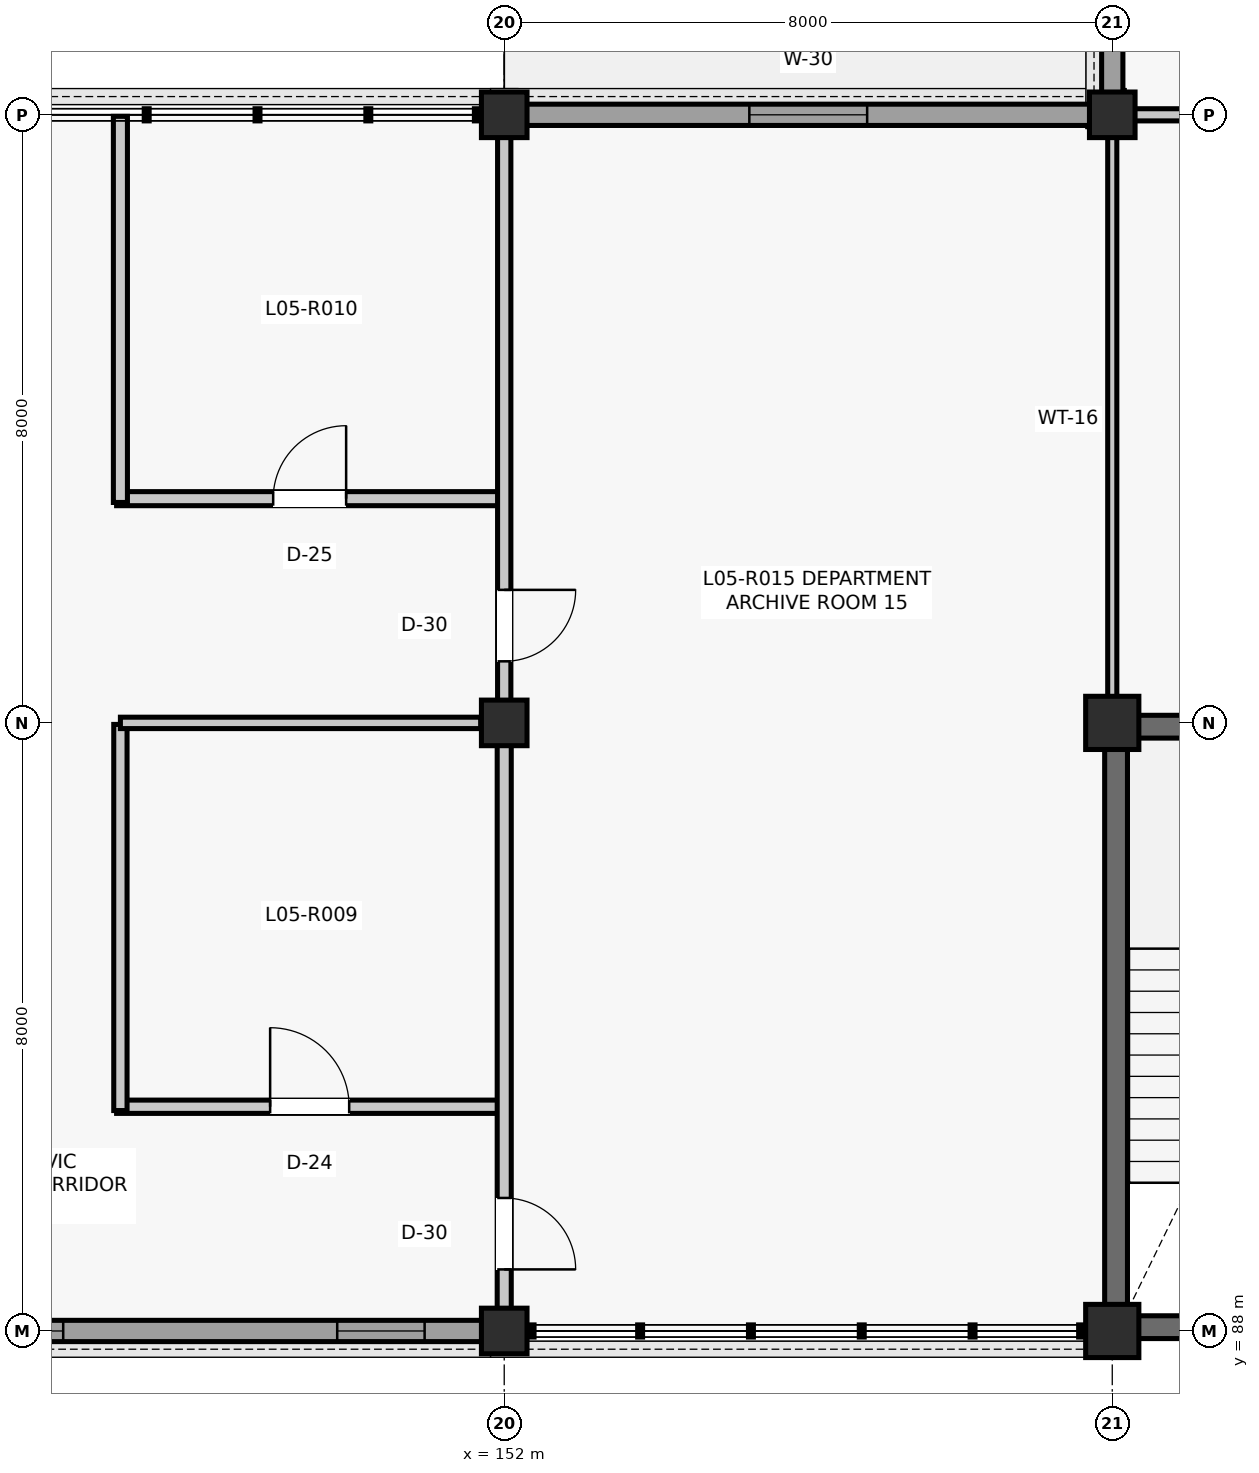
"""IFC4 building model, lengths in metres.
Left out: names, types, materials, properties, quantities, classifications, styles, units other than length and angle.
Written with IfcOpenShell. Run it as: python <this file> out.ifc"""

import sys

from ifc_helpers import new_model, si_unit, direction, frame, frame_2d, origin, origin_2d, place, context, subcontext, project, spatial, rectangle, extrude, element, fill, save


model = new_model("IFC4")
c1 = context("Model", 3, precision=1e-05, world=origin(), true_north=direction((0.0, 1.0)))
c2 = subcontext(c1, "Body", "Model", "MODEL_VIEW")
j1 = project(units=[si_unit("LENGTHUNIT", "METRE"), si_unit("PLANEANGLEUNIT", "RADIAN")], contexts=[c1])
p1 = place(None, origin())
s1 = spatial("IfcSite", under=j1, at=p1, CompositionType="ELEMENT")
p2 = place(p1, origin())
s2 = spatial("IfcBuilding", under=s1, at=p2, CompositionType="ELEMENT")
p3 = place(p2, frame((0.0, 0.0, 21.78)))
s3 = spatial("IfcBuildingStorey", under=s2, at=p3, CompositionType="ELEMENT", Elevation=21.78)
for number, where, z_axis, x_axis in (
    (1, (152.0, 88.0, 0.0), (0.0, 0.0, 1.0), (1.0, 0.0, 0.0)),
    (2, (152.0, 96.0, 0.0), (0.0, 0.0, 1.0), (1.0, 0.0, 0.0)),
    (3, (152.0, 104.0, 0.0), (0.0, 0.0, 1.0), (1.0, 0.0, 0.0)),
):
    element("IfcColumn", number, at=place(p3, frame(where, z_axis=z_axis, x_axis=x_axis)), inside=s3, PredefinedType="COLUMN", context=c2, shape_type="SweptSolid", body=[
        extrude(rectangle(XDim=0.6, YDim=0.6, at=origin_2d()), origin(), (0.0, 0.0, 1.0), 3.96),
    ])
for number, where, z_axis, x_axis in (
    (4, (160.0, 88.0, 0.0), (0.0, 0.0, 1.0), (1.0, 0.0, 0.0)),
    (5, (160.0, 96.0, 0.0), (0.0, 0.0, 1.0), (1.0, 0.0, 0.0)),
):
    element("IfcColumn", number, at=place(p3, frame(where, z_axis=z_axis, x_axis=x_axis)), inside=s3, PredefinedType="COLUMN", context=c2, shape_type="SweptSolid", body=[
        extrude(rectangle(XDim=0.7, YDim=0.7, at=origin_2d()), origin(), (0.0, 0.0, 1.0), 3.96),
    ])
p4 = place(p3, frame((160.0, 104.0, 0.0), z_axis=(0.0, 0.0, 1.0), x_axis=(1.0, 0.0, 0.0)))
e6 = element("IfcColumn", 6, at=p4, inside=s3, PredefinedType="COLUMN", context=c2, shape_type="SweptSolid", body=[
    extrude(rectangle(XDim=0.6, YDim=0.6, at=origin_2d()), origin(), (0.0, 0.0, 1.0), 3.96),
])
p5 = place(p3, frame((144.285, 88.0, 0.0), z_axis=(0.0, 0.0, 1.0), x_axis=(1.0, 0.0, 0.0)))
e7 = element("IfcWall", 7, at=p5, inside=s3, PredefinedType="SOLIDWALL", context=c2, shape_type="SweptSolid", body=[
    extrude(rectangle(XDim=7.43, YDim=0.28, at=frame_2d((3.715, 0.0))), origin(), (0.0, 0.0, 1.0), 3.309),
])
p6 = place(p5, frame((0.762, 0.0, 0.95)))
e8 = element("IfcOpeningElement", 8, at=p6, cuts=e7, PredefinedType="OPENING", context=c2, shape_type="SweptSolid", body=[
    extrude(rectangle(XDim=1.15, YDim=1.65, at=frame_2d((0.575, 0.825))), frame((0.0, 0.15, 0.0), z_axis=(0.0, -1.0, 0.0), x_axis=(1.0, 0.0, 0.0)), (0.0, 0.0, 1.0), 0.3),
])
p7 = place(p5, frame((5.518, 0.0, 0.95)))
e9 = element("IfcOpeningElement", 9, at=p7, cuts=e7, PredefinedType="OPENING", context=c2, shape_type="SweptSolid", body=[
    extrude(rectangle(XDim=1.15, YDim=1.65, at=frame_2d((0.575, 0.825))), frame((0.0, 0.15, 0.0), z_axis=(0.0, -1.0, 0.0), x_axis=(1.0, 0.0, 0.0)), (0.0, 0.0, 1.0), 0.3),
])
p8 = place(p3, frame((152.285, 104.0, 0.0), z_axis=(0.0, 0.0, 1.0), x_axis=(1.0, 0.0, 0.0)))
e10 = element("IfcWall", 10, at=p8, inside=s3, PredefinedType="SOLIDWALL", context=c2, shape_type="SweptSolid", body=[
    extrude(rectangle(XDim=7.43, YDim=0.28, at=frame_2d((3.715, 0.0))), origin(), (0.0, 0.0, 1.0), 3.264),
])
p9 = place(p8, frame((2.94, 0.0, 0.9)))
e11 = element("IfcOpeningElement", 11, at=p9, cuts=e10, PredefinedType="OPENING", context=c2, shape_type="SweptSolid", body=[
    extrude(rectangle(XDim=1.55, YDim=2.05, at=frame_2d((0.775, 1.025))), frame((0.0, 0.15, 0.0), z_axis=(0.0, -1.0, 0.0), x_axis=(1.0, 0.0, 0.0)), (0.0, 0.0, 1.0), 0.3),
])
p10 = place(p3, frame((160.0, 104.285, 0.0), z_axis=(0.0, 0.0, 1.0), x_axis=(0.0, 1.0, 0.0)))
e12 = element("IfcWall", 12, at=p10, inside=s3, PredefinedType="SOLIDWALL", context=c2, shape_type="SweptSolid", body=[
    extrude(rectangle(XDim=7.43, YDim=0.28, at=frame_2d((3.715, 0.0))), origin(), (0.0, 0.0, 1.0), 3.259),
])
p11 = place(p10, frame((0.862, 0.0, 1.2)))
e13 = element("IfcOpeningElement", 13, at=p11, cuts=e12, PredefinedType="OPENING", context=c2, shape_type="SweptSolid", body=[
    extrude(rectangle(XDim=0.95, YDim=1.4, at=frame_2d((0.475, 0.7))), frame((0.0, 0.15, 0.0), z_axis=(0.0, -1.0, 0.0), x_axis=(1.0, 0.0, 0.0)), (0.0, 0.0, 1.0), 0.3),
])
p12 = place(p10, frame((5.618, 0.0, 1.2)))
e14 = element("IfcOpeningElement", 14, at=p12, cuts=e12, PredefinedType="OPENING", context=c2, shape_type="SweptSolid", body=[
    extrude(rectangle(XDim=0.95, YDim=1.4, at=frame_2d((0.475, 0.7))), frame((0.0, 0.15, 0.0), z_axis=(0.0, -1.0, 0.0), x_axis=(1.0, 0.0, 0.0)), (0.0, 0.0, 1.0), 0.3),
])
for number, where, z_axis, x_axis in (
    (15, (160.05, 88.24, 0.0), (0.0, 0.0, 1.0), (0.0, 1.0, 0.0)),
    (16, (160.24, 95.95, 0.0), (0.0, 0.0, 1.0), (1.0, 0.0, 0.0)),
):
    element("IfcWall", number, at=place(p3, frame(where, z_axis=z_axis, x_axis=x_axis)), inside=s3, PredefinedType="SHEAR", context=c2, shape_type="SweptSolid", body=[
        extrude(rectangle(XDim=7.52, YDim=0.3, at=frame_2d((3.76, 0.0))), origin(), (0.0, 0.0, 1.0), 3.735),
    ])
p13 = place(p3, frame((160.24, 88.05, 0.0), z_axis=(0.0, 0.0, 1.0), x_axis=(1.0, 0.0, 0.0)))
e17 = element("IfcWall", 17, at=p13, inside=s3, PredefinedType="SHEAR", context=c2, shape_type="SweptSolid", body=[
    extrude(rectangle(XDim=3.91, YDim=0.3, at=frame_2d((1.955, 0.0))), origin(), (0.0, 0.0, 1.0), 3.735),
])
p14 = place(p3, frame((146.9, 90.95, 0.0), z_axis=(0.0, 0.0, 1.0), x_axis=(1.0, 0.0, 0.0)))
e18 = element("IfcWall", 18, at=p14, inside=s3, PredefinedType="PARTITIONING", context=c2, shape_type="SweptSolid", body=[
    extrude(rectangle(XDim=5.08, YDim=0.175, at=frame_2d((2.54, 0.0))), origin(), (0.0, 0.0, 1.0), 3.252),
])
p15 = place(p14, frame((2.02, 0.0, 0.0)))
e19 = element("IfcOpeningElement", 19, at=p15, cuts=e18, PredefinedType="OPENING", context=c2, shape_type="SweptSolid", body=[
    extrude(rectangle(XDim=1.04, YDim=2.18, at=frame_2d((0.52, 1.09))), frame((0.0, 0.097, 0.0), z_axis=(0.0, -1.0, 0.0), x_axis=(1.0, 0.0, 0.0)), (0.0, 0.0, 1.0), 0.195),
])
p16 = place(p3, frame((146.95, 90.9, 0.0), z_axis=(0.0, 0.0, 1.0), x_axis=(0.0, 1.0, 0.0)))
e20 = element("IfcWall", 20, at=p16, inside=s3, PredefinedType="PARTITIONING", context=c2, shape_type="SweptSolid", body=[
    extrude(rectangle(XDim=5.08, YDim=0.175, at=frame_2d((2.54, 0.0))), origin(), (0.0, 0.0, 1.0), 3.251),
])
p17 = place(p3, frame((146.95, 96.0, 0.0), z_axis=(0.0, 0.0, 1.0), x_axis=(1.0, 0.0, 0.0)))
e21 = element("IfcWall", 21, at=p17, inside=s3, PredefinedType="PARTITIONING", context=c2, shape_type="SweptSolid", body=[
    extrude(rectangle(XDim=4.74, YDim=0.15, at=frame_2d((2.37, 0.0))), origin(), (0.0, 0.0, 1.0), 3.251),
])
p18 = place(p3, frame((146.9, 98.95, 0.0), z_axis=(0.0, 0.0, 1.0), x_axis=(1.0, 0.0, 0.0)))
e22 = element("IfcWall", 22, at=p18, inside=s3, PredefinedType="PARTITIONING", context=c2, shape_type="SweptSolid", body=[
    extrude(rectangle(XDim=5.08, YDim=0.185, at=frame_2d((2.54, 0.0))), origin(), (0.0, 0.0, 1.0), 3.263),
])
p19 = place(p18, frame((2.06, 0.0, 0.0)))
e23 = element("IfcOpeningElement", 23, at=p19, cuts=e22, PredefinedType="OPENING", context=c2, shape_type="SweptSolid", body=[
    extrude(rectangle(XDim=0.96, YDim=2.14, at=frame_2d((0.48, 1.07))), frame((0.0, 0.103, 0.0), z_axis=(0.0, -1.0, 0.0), x_axis=(1.0, 0.0, 0.0)), (0.0, 0.0, 1.0), 0.205),
])
p20 = place(p3, frame((146.95, 98.9, 0.0), z_axis=(0.0, 0.0, 1.0), x_axis=(0.0, 1.0, 0.0)))
e24 = element("IfcWall", 24, at=p20, inside=s3, PredefinedType="PARTITIONING", context=c2, shape_type="SweptSolid", body=[
    extrude(rectangle(XDim=5.08, YDim=0.185, at=frame_2d((2.54, 0.0))), origin(), (0.0, 0.0, 1.0), 3.414),
])
p21 = place(p3, frame((152.0, 88.29, 0.0), z_axis=(0.0, 0.0, 1.0), x_axis=(0.0, 1.0, 0.0)))
e25 = element("IfcWall", 25, at=p21, inside=s3, PredefinedType="PARTITIONING", context=c2, shape_type="SweptSolid", body=[
    extrude(rectangle(XDim=7.42, YDim=0.185, at=frame_2d((3.71, 0.0))), origin(), (0.0, 0.0, 1.0), 3.252),
])
p22 = place(p21, frame((0.52, 0.0, 0.0)))
e26 = element("IfcOpeningElement", 26, at=p22, cuts=e25, PredefinedType="OPENING", context=c2, shape_type="SweptSolid", body=[
    extrude(rectangle(XDim=0.94, YDim=2.12, at=frame_2d((0.47, 1.06))), frame((0.0, 0.103, 0.0), z_axis=(0.0, -1.0, 0.0), x_axis=(1.0, 0.0, 0.0)), (0.0, 0.0, 1.0), 0.205),
])
p23 = place(p3, frame((152.0, 96.29, 0.0), z_axis=(0.0, 0.0, 1.0), x_axis=(0.0, 1.0, 0.0)))
e27 = element("IfcWall", 27, at=p23, inside=s3, PredefinedType="PARTITIONING", context=c2, shape_type="SweptSolid", body=[
    extrude(rectangle(XDim=7.42, YDim=0.175, at=frame_2d((3.71, 0.0))), origin(), (0.0, 0.0, 1.0), 3.263),
])
p24 = place(p23, frame((0.52, 0.0, 0.0)))
e28 = element("IfcOpeningElement", 28, at=p24, cuts=e27, PredefinedType="OPENING", context=c2, shape_type="SweptSolid", body=[
    extrude(rectangle(XDim=0.94, YDim=2.12, at=frame_2d((0.47, 1.06))), frame((0.0, 0.097, 0.0), z_axis=(0.0, -1.0, 0.0), x_axis=(1.0, 0.0, 0.0)), (0.0, 0.0, 1.0), 0.195),
])
p25 = place(p3, frame((160.0, 96.34, 0.0), z_axis=(0.0, 0.0, 1.0), x_axis=(0.0, 1.0, 0.0)))
e29 = element("IfcWall", 29, at=p25, inside=s3, PredefinedType="PARTITIONING", context=c2, shape_type="SweptSolid", body=[
    extrude(rectangle(XDim=7.37, YDim=0.12, at=frame_2d((3.685, 0.0))), origin(), (0.0, 0.0, 1.0), 3.462),
])
p26 = place(p3, frame((160.29, 104.0, 0.0), z_axis=(0.0, 0.0, 1.0), x_axis=(1.0, 0.0, 0.0)))
e30 = element("IfcWall", 30, at=p26, inside=s3, PredefinedType="PARTITIONING", context=c2, shape_type="SweptSolid", body=[
    extrude(rectangle(XDim=7.42, YDim=0.16, at=frame_2d((3.71, 0.0))), origin(), (0.0, 0.0, 1.0), 3.263),
])
p27 = place(p6, origin())
e31 = element("IfcWindow", 31, at=p27, inside=s3, PartitioningType="SINGLE_PANEL", PredefinedType="WINDOW", context=c2, shape_type="SweptSolid", body=[
    extrude(rectangle(XDim=1.15, YDim=1.65, at=frame_2d((0.575, 0.825))), frame((0.0, 0.03, 0.0), z_axis=(0.0, -1.0, 0.0), x_axis=(1.0, 0.0, 0.0)), (0.0, 0.0, 1.0), 0.06),
])
fill(e8, e31)
p28 = place(p7, origin())
e32 = element("IfcWindow", 32, at=p28, inside=s3, PartitioningType="SINGLE_PANEL", PredefinedType="WINDOW", context=c2, shape_type="SweptSolid", body=[
    extrude(rectangle(XDim=1.15, YDim=1.65, at=frame_2d((0.575, 0.825))), frame((0.0, 0.03, 0.0), z_axis=(0.0, -1.0, 0.0), x_axis=(1.0, 0.0, 0.0)), (0.0, 0.0, 1.0), 0.06),
])
fill(e9, e32)
p29 = place(p9, origin())
e33 = element("IfcWindow", 33, at=p29, inside=s3, PartitioningType="SINGLE_PANEL", PredefinedType="WINDOW", context=c2, shape_type="SweptSolid", body=[
    extrude(rectangle(XDim=1.55, YDim=2.05, at=frame_2d((0.775, 1.025))), frame((0.0, 0.03, 0.0), z_axis=(0.0, -1.0, 0.0), x_axis=(1.0, 0.0, 0.0)), (0.0, 0.0, 1.0), 0.06),
])
fill(e11, e33)
p30 = place(p15, origin())
e34 = element("IfcDoor", 34, at=p30, inside=s3, OperationType="SINGLE_SWING_LEFT", PredefinedType="DOOR", context=c2, shape_type="SweptSolid", body=[
    extrude(rectangle(XDim=1.04, YDim=2.18, at=frame_2d((0.52, 1.09))), frame((0.0, 0.025, 0.0), z_axis=(0.0, -1.0, 0.0), x_axis=(1.0, 0.0, 0.0)), (0.0, 0.0, 1.0), 0.05),
])
fill(e19, e34)
p31 = place(p19, origin())
e35 = element("IfcDoor", 35, at=p31, inside=s3, OperationType="SINGLE_SWING_RIGHT", PredefinedType="DOOR", context=c2, shape_type="SweptSolid", body=[
    extrude(rectangle(XDim=0.96, YDim=2.14, at=frame_2d((0.48, 1.07))), frame((0.0, 0.025, 0.0), z_axis=(0.0, -1.0, 0.0), x_axis=(1.0, 0.0, 0.0)), (0.0, 0.0, 1.0), 0.05),
])
fill(e23, e35)
p32 = place(p22, frame((0.94, 0.0, 0.0), z_axis=(0.0, 0.0, 1.0), x_axis=(-1.0, 0.0, 0.0)))
e36 = element("IfcDoor", 36, at=p32, inside=s3, OperationType="SINGLE_SWING_LEFT", PredefinedType="DOOR", context=c2, shape_type="SweptSolid", body=[
    extrude(rectangle(XDim=0.94, YDim=2.12, at=frame_2d((0.47, 1.06))), frame((0.0, 0.025, 0.0), z_axis=(0.0, -1.0, 0.0), x_axis=(1.0, 0.0, 0.0)), (0.0, 0.0, 1.0), 0.05),
])
fill(e26, e36)
p33 = place(p24, frame((0.94, 0.0, 0.0), z_axis=(0.0, 0.0, 1.0), x_axis=(-1.0, 0.0, 0.0)))
e37 = element("IfcDoor", 37, at=p33, inside=s3, OperationType="SINGLE_SWING_RIGHT", PredefinedType="DOOR", context=c2, shape_type="SweptSolid", body=[
    extrude(rectangle(XDim=0.94, YDim=2.12, at=frame_2d((0.47, 1.06))), frame((0.0, 0.025, 0.0), z_axis=(0.0, -1.0, 0.0), x_axis=(1.0, 0.0, 0.0)), (0.0, 0.0, 1.0), 0.05),
])
fill(e28, e37)
save(model, sys.argv[1])
